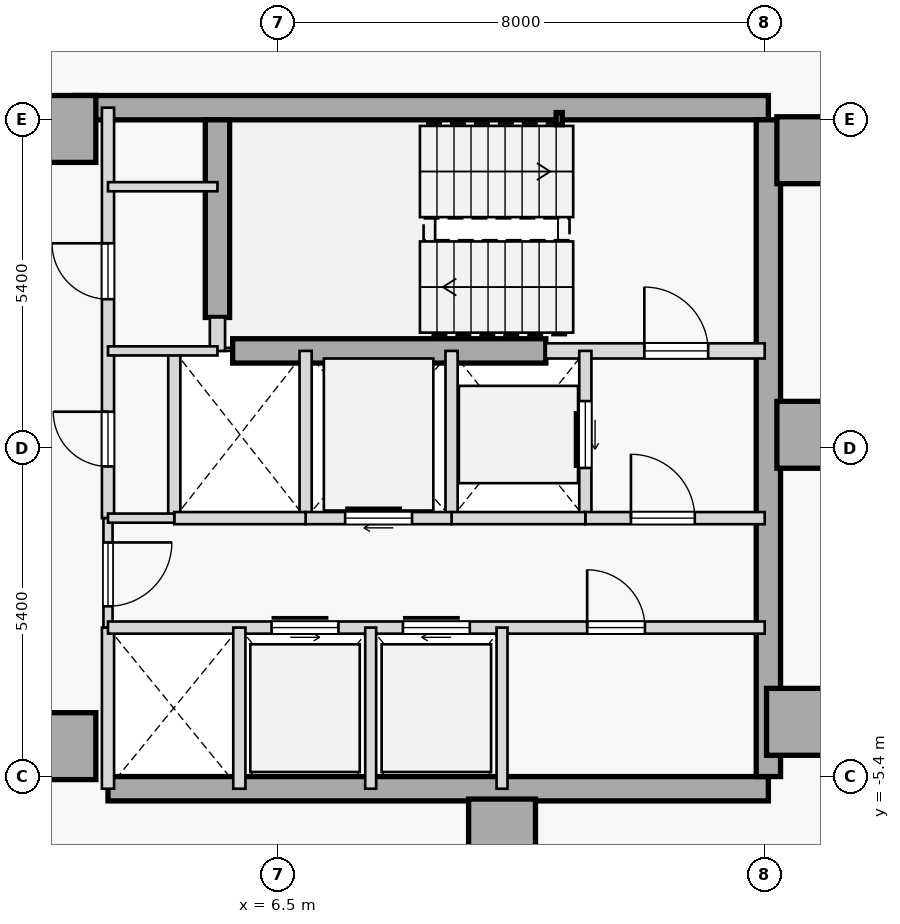
"""IFC4 building model, lengths in metres.
Left out: names, types, materials, properties, quantities, classifications, styles, units other than length and angle.
Written with IfcOpenShell. Run it as: python <this file> out.ifc"""

import sys

from ifc_helpers import new_model, si_unit, direction, frame, frame_2d, origin, origin_2d, place, context, subcontext, project, spatial, rectangle, hollow_rectangle, extrude, element, fill, save


model = new_model("IFC4")
c1 = context("Model", 3, precision=1e-05, world=origin(), true_north=direction((0.0, 1.0)))
c2 = subcontext(c1, "Body", "Model", "MODEL_VIEW")
j1 = project(units=[si_unit("LENGTHUNIT", "METRE"), si_unit("PLANEANGLEUNIT", "RADIAN")], contexts=[c1])
p1 = place(None, origin())
s1 = spatial("IfcSite", under=j1, at=p1, CompositionType="ELEMENT")
p2 = place(p1, origin())
s2 = spatial("IfcBuilding", under=s1, at=p2, CompositionType="ELEMENT")
p3 = place(p2, frame((0.0, 0.0, 151.4)))
s3 = spatial("IfcBuildingStorey", under=s2, at=p3, CompositionType="ELEMENT", Elevation=151.4)
for number, where, z_axis, x_axis in (
    (1, (15.25, 4.9, 0.0), (0.0, 0.0, 1.0), (1.0, 0.0, 0.0)),
    (2, (15.25, 0.22, 0.0), (0.0, 0.0, 1.0), (1.0, 0.0, 0.0)),
    (3, (15.08, -4.5, 0.0), (0.0, 0.0, 1.0), (1.0, 0.0, 0.0)),
    (4, (10.18, -6.32, 0.0), (0.0, 0.0, 1.0), (1.0, 0.0, 0.0)),
    (5, (2.95, -4.9, 0.0), (0.0, 0.0, 1.0), (1.0, 0.0, 0.0)),
    (6, (2.95, 5.25, 0.0), (0.0, 0.0, 1.0), (1.0, 0.0, 0.0)),
):
    element("IfcColumn", number, at=place(p3, frame(where, z_axis=z_axis, x_axis=x_axis)), inside=s3, PredefinedType="COLUMN", context=c2, shape_type="SweptSolid", body=[
        extrude(rectangle(XDim=1.1, YDim=1.1, at=origin_2d()), origin(), (0.0, 0.0, 1.0), 3.4),
    ])
p4 = place(p3, frame((3.15, 5.6, 0.0), z_axis=(0.0, 0.0, 1.0), x_axis=(1.0, 0.0, 0.0)))
e7 = element("IfcWall", 7, at=p4, inside=s3, PredefinedType="SHEAR", context=c2, shape_type="SweptSolid", body=[
    extrude(rectangle(XDim=11.41, YDim=0.4, at=frame_2d((5.705, 0.0))), origin(), (0.0, 0.0, 1.0), 3.175),
])
p5 = place(p3, frame((3.7, -5.6, 0.0), z_axis=(0.0, 0.0, 1.0), x_axis=(1.0, 0.0, 0.0)))
e8 = element("IfcWall", 8, at=p5, inside=s3, PredefinedType="SHEAR", context=c2, shape_type="SweptSolid", body=[
    extrude(rectangle(XDim=10.86, YDim=0.4, at=frame_2d((5.43, 0.0))), origin(), (0.0, 0.0, 1.0), 3.175),
])
p6 = place(p3, frame((14.56, -5.4, 0.0), z_axis=(0.0, 0.0, 1.0), x_axis=(0.0, 1.0, 0.0)))
e9 = element("IfcWall", 9, at=p6, inside=s3, PredefinedType="SHEAR", context=c2, shape_type="SweptSolid", body=[
    extrude(rectangle(XDim=10.8, YDim=0.4, at=frame_2d((5.4, 0.0))), origin(), (0.0, 0.0, 1.0), 3.175),
])
p7 = place(p3, frame((5.5, 2.15, 0.0), z_axis=(0.0, 0.0, 1.0), x_axis=(0.0, 1.0, 0.0)))
e10 = element("IfcWall", 10, at=p7, inside=s3, PredefinedType="SHEAR", context=c2, shape_type="SweptSolid", body=[
    extrude(rectangle(XDim=3.25, YDim=0.4, at=frame_2d((1.625, 0.0))), origin(), (0.0, 0.0, 1.0), 3.175),
])
p8 = place(p3, frame((5.75, 1.6, 0.0), z_axis=(0.0, 0.0, 1.0), x_axis=(1.0, 0.0, 0.0)))
e11 = element("IfcWall", 11, at=p8, inside=s3, PredefinedType="SHEAR", context=c2, shape_type="SweptSolid", body=[
    extrude(rectangle(XDim=5.15, YDim=0.4, at=frame_2d((2.575, 0.0))), origin(), (0.0, 0.0, 1.0), 3.175),
])
p9 = place(p3, frame((11.12, 5.42, 0.0), z_axis=(0.0, 0.0, 1.0), x_axis=(1.0, 0.0, 0.0)))
e12 = element("IfcColumn", 12, at=p9, inside=s3, PredefinedType="COLUMN", context=c2, shape_type="SweptSolid", body=[
    extrude(hollow_rectangle(XDim=0.1, YDim=0.2, WallThickness=0.008, at=origin_2d()), origin(), (0.0, 0.0, 1.0), 3.4),
])
p10 = place(p3, frame((10.9, 1.6, 0.0), z_axis=(0.0, 0.0, 1.0), x_axis=(1.0, 0.0, 0.0)))
e13 = element("IfcWall", 13, at=p10, inside=s3, PredefinedType="STANDARD", context=c2, shape_type="SweptSolid", body=[
    extrude(rectangle(XDim=3.6, YDim=0.25, at=frame_2d((1.8, 0.0))), origin(), (0.0, 0.0, 1.0), 3.175),
])
p11 = place(p10, frame((1.62, 0.0, 0.0)))
e14 = element("IfcOpeningElement", 14, at=p11, cuts=e13, PredefinedType="OPENING", context=c2, shape_type="SweptSolid", body=[
    extrude(rectangle(XDim=1.05, YDim=2.15, at=frame_2d((0.525, 1.075))), frame((0.0, 0.135, 0.0), z_axis=(0.0, -1.0, 0.0), x_axis=(1.0, 0.0, 0.0)), (0.0, 0.0, 1.0), 0.27),
])
p12 = place(p3, frame((5.5, 1.6, 0.0), z_axis=(0.0, 0.0, 1.0), x_axis=(0.0, 1.0, 0.0)))
e15 = element("IfcWall", 15, at=p12, inside=s3, PredefinedType="STANDARD", context=c2, shape_type="SweptSolid", body=[
    extrude(rectangle(XDim=0.55, YDim=0.25, at=frame_2d((0.275, 0.0))), origin(), (0.0, 0.0, 1.0), 3.175),
])
p13 = place(p3, frame((3.7, -1.15, 0.0), z_axis=(0.0, 0.0, 1.0), x_axis=(0.0, 1.0, 0.0)))
e16 = element("IfcWall", 16, at=p13, inside=s3, PredefinedType="STANDARD", context=c2, shape_type="SweptSolid", body=[
    extrude(rectangle(XDim=6.75, YDim=0.2, at=frame_2d((3.375, 0.0))), origin(), (0.0, 0.0, 1.0), 3.175),
])
p14 = place(p13, frame((3.6, 0.0, 0.0)))
e17 = element("IfcOpeningElement", 17, at=p14, cuts=e16, PredefinedType="OPENING", context=c2, shape_type="SweptSolid", body=[
    extrude(rectangle(XDim=0.92, YDim=2.15, at=frame_2d((0.46, 1.075))), frame((0.0, 0.11, 0.0), z_axis=(0.0, -1.0, 0.0), x_axis=(1.0, 0.0, 0.0)), (0.0, 0.0, 1.0), 0.22),
])
p15 = place(p13, frame((0.85, 0.0, 0.0)))
e18 = element("IfcOpeningElement", 18, at=p15, cuts=e16, PredefinedType="OPENING", context=c2, shape_type="SweptSolid", body=[
    extrude(rectangle(XDim=0.9, YDim=2.15, at=frame_2d((0.45, 1.075))), frame((0.0, 0.11, 0.0), z_axis=(0.0, -1.0, 0.0), x_axis=(1.0, 0.0, 0.0)), (0.0, 0.0, 1.0), 0.22),
])
p16 = place(p3, frame((3.7, -2.95, 0.0), z_axis=(0.0, 0.0, 1.0), x_axis=(0.0, 1.0, 0.0)))
e19 = element("IfcWall", 19, at=p16, inside=s3, PredefinedType="PARTITIONING", context=c2, shape_type="SweptSolid", body=[
    extrude(rectangle(XDim=1.8, YDim=0.15, at=frame_2d((0.9, 0.0))), origin(), (0.0, 0.0, 1.0), 3.175),
])
p17 = place(p16, frame((0.35, 0.0, 0.0)))
e20 = element("IfcOpeningElement", 20, at=p17, cuts=e19, PredefinedType="OPENING", context=c2, shape_type="SweptSolid", body=[
    extrude(rectangle(XDim=1.05, YDim=2.18, at=frame_2d((0.525, 1.09))), frame((0.0, 0.085, 0.0), z_axis=(0.0, -1.0, 0.0), x_axis=(1.0, 0.0, 0.0)), (0.0, 0.0, 1.0), 0.17),
])
p18 = place(p3, frame((3.7, -5.6, 0.0), z_axis=(0.0, 0.0, 1.0), x_axis=(0.0, 1.0, 0.0)))
e21 = element("IfcWall", 21, at=p18, inside=s3, PredefinedType="STANDARD", context=c2, shape_type="SweptSolid", body=[
    extrude(rectangle(XDim=2.65, YDim=0.2, at=frame_2d((1.325, 0.0))), origin(), (0.0, 0.0, 1.0), 3.175),
])
p19 = place(p3, frame((11.55, -1.15, 0.0), z_axis=(0.0, 0.0, 1.0), x_axis=(0.0, 1.0, 0.0)))
e22 = element("IfcWall", 22, at=p19, inside=s3, PredefinedType="STANDARD", context=c2, shape_type="SweptSolid", body=[
    extrude(rectangle(XDim=2.75, YDim=0.2, at=frame_2d((1.375, 0.0))), origin(), (0.0, 0.0, 1.0), 3.175),
])
p20 = place(p19, frame((0.825, 0.0, 0.0)))
e23 = element("IfcOpeningElement", 23, at=p20, cuts=e22, PredefinedType="OPENING", context=c2, shape_type="SweptSolid", body=[
    extrude(rectangle(XDim=1.1, YDim=2.15, at=frame_2d((0.55, 1.075))), frame((0.0, 0.11, 0.0), z_axis=(0.0, -1.0, 0.0), x_axis=(1.0, 0.0, 0.0)), (0.0, 0.0, 1.0), 0.22),
])
p21 = place(p3, frame((9.35, -1.15, 0.0), z_axis=(0.0, 0.0, 1.0), x_axis=(0.0, 1.0, 0.0)))
e24 = element("IfcWall", 24, at=p21, inside=s3, PredefinedType="STANDARD", context=c2, shape_type="SweptSolid", body=[
    extrude(rectangle(XDim=2.75, YDim=0.2, at=frame_2d((1.375, 0.0))), origin(), (0.0, 0.0, 1.0), 3.175),
])
p22 = place(p3, frame((11.55, -1.15, 0.0), z_axis=(0.0, 0.0, 1.0), x_axis=(1.0, 0.0, 0.0)))
e25 = element("IfcWall", 25, at=p22, inside=s3, PredefinedType="STANDARD", context=c2, shape_type="SweptSolid", body=[
    extrude(rectangle(XDim=2.95, YDim=0.2, at=frame_2d((1.475, 0.0))), origin(), (0.0, 0.0, 1.0), 3.175),
])
p23 = place(p22, frame((0.75, 0.0, 0.0)))
e26 = element("IfcOpeningElement", 26, at=p23, cuts=e25, PredefinedType="OPENING", context=c2, shape_type="SweptSolid", body=[
    extrude(rectangle(XDim=1.05, YDim=2.18, at=frame_2d((0.525, 1.09))), frame((0.0, 0.11, 0.0), z_axis=(0.0, -1.0, 0.0), x_axis=(1.0, 0.0, 0.0)), (0.0, 0.0, 1.0), 0.22),
])
p24 = place(p3, frame((9.35, -1.15, 0.0), z_axis=(0.0, 0.0, 1.0), x_axis=(1.0, 0.0, 0.0)))
e27 = element("IfcWall", 27, at=p24, inside=s3, PredefinedType="STANDARD", context=c2, shape_type="SweptSolid", body=[
    extrude(rectangle(XDim=2.2, YDim=0.2, at=frame_2d((1.1, 0.0))), origin(), (0.0, 0.0, 1.0), 3.175),
])
p25 = place(p3, frame((6.95, -1.15, 0.0), z_axis=(0.0, 0.0, 1.0), x_axis=(0.0, 1.0, 0.0)))
e28 = element("IfcWall", 28, at=p25, inside=s3, PredefinedType="STANDARD", context=c2, shape_type="SweptSolid", body=[
    extrude(rectangle(XDim=2.75, YDim=0.2, at=frame_2d((1.375, 0.0))), origin(), (0.0, 0.0, 1.0), 3.175),
])
p26 = place(p3, frame((6.95, -1.15, 0.0), z_axis=(0.0, 0.0, 1.0), x_axis=(1.0, 0.0, 0.0)))
e29 = element("IfcWall", 29, at=p26, inside=s3, PredefinedType="STANDARD", context=c2, shape_type="SweptSolid", body=[
    extrude(rectangle(XDim=2.4, YDim=0.2, at=frame_2d((1.2, 0.0))), origin(), (0.0, 0.0, 1.0), 3.175),
])
p27 = place(p26, frame((0.65, 0.0, 0.0)))
e30 = element("IfcOpeningElement", 30, at=p27, cuts=e29, PredefinedType="OPENING", context=c2, shape_type="SweptSolid", body=[
    extrude(rectangle(XDim=1.1, YDim=2.15, at=frame_2d((0.55, 1.075))), frame((0.0, 0.11, 0.0), z_axis=(0.0, -1.0, 0.0), x_axis=(1.0, 0.0, 0.0)), (0.0, 0.0, 1.0), 0.22),
])
p28 = place(p3, frame((4.79, -1.15, 0.0), z_axis=(0.0, 0.0, 1.0), x_axis=(0.0, 1.0, 0.0)))
e31 = element("IfcWall", 31, at=p28, inside=s3, PredefinedType="STANDARD", context=c2, shape_type="SweptSolid", body=[
    extrude(rectangle(XDim=2.75, YDim=0.2, at=frame_2d((1.375, 0.0))), origin(), (0.0, 0.0, 1.0), 3.175),
])
p29 = place(p3, frame((4.79, -1.15, 0.0), z_axis=(0.0, 0.0, 1.0), x_axis=(1.0, 0.0, 0.0)))
e32 = element("IfcWall", 32, at=p29, inside=s3, PredefinedType="STANDARD", context=c2, shape_type="SweptSolid", body=[
    extrude(rectangle(XDim=2.16, YDim=0.2, at=frame_2d((1.08, 0.0))), origin(), (0.0, 0.0, 1.0), 3.175),
])
p30 = place(p3, frame((3.7, -1.15, 0.0), z_axis=(0.0, 0.0, 1.0), x_axis=(1.0, 0.0, 0.0)))
e33 = element("IfcWall", 33, at=p30, inside=s3, PredefinedType="PARTITIONING", context=c2, shape_type="SweptSolid", body=[
    extrude(rectangle(XDim=1.09, YDim=0.15, at=frame_2d((0.545, 0.0))), origin(), (0.0, 0.0, 1.0), 3.175),
])
p31 = place(p3, frame((3.7, -2.95, 0.0), z_axis=(0.0, 0.0, 1.0), x_axis=(1.0, 0.0, 0.0)))
e34 = element("IfcWall", 34, at=p31, inside=s3, PredefinedType="STANDARD", context=c2, shape_type="SweptSolid", body=[
    extrude(rectangle(XDim=10.8, YDim=0.2, at=frame_2d((5.4, 0.0))), origin(), (0.0, 0.0, 1.0), 3.175),
])
p32 = place(p31, frame((2.69, 0.0, 0.0)))
e35 = element("IfcOpeningElement", 35, at=p32, cuts=e34, PredefinedType="OPENING", context=c2, shape_type="SweptSolid", body=[
    extrude(rectangle(XDim=1.1, YDim=2.15, at=frame_2d((0.55, 1.075))), frame((0.0, 0.11, 0.0), z_axis=(0.0, -1.0, 0.0), x_axis=(1.0, 0.0, 0.0)), (0.0, 0.0, 1.0), 0.22),
])
p33 = place(p31, frame((4.85, 0.0, 0.0)))
e36 = element("IfcOpeningElement", 36, at=p33, cuts=e34, PredefinedType="OPENING", context=c2, shape_type="SweptSolid", body=[
    extrude(rectangle(XDim=1.1, YDim=2.15, at=frame_2d((0.55, 1.075))), frame((0.0, 0.11, 0.0), z_axis=(0.0, -1.0, 0.0), x_axis=(1.0, 0.0, 0.0)), (0.0, 0.0, 1.0), 0.22),
])
p34 = place(p31, frame((7.88, 0.0, 0.0)))
e37 = element("IfcOpeningElement", 37, at=p34, cuts=e34, PredefinedType="OPENING", context=c2, shape_type="SweptSolid", body=[
    extrude(rectangle(XDim=0.95, YDim=2.15, at=frame_2d((0.475, 1.075))), frame((0.0, 0.11, 0.0), z_axis=(0.0, -1.0, 0.0), x_axis=(1.0, 0.0, 0.0)), (0.0, 0.0, 1.0), 0.22),
])
p35 = place(p3, frame((5.86, -5.6, 0.0), z_axis=(0.0, 0.0, 1.0), x_axis=(0.0, 1.0, 0.0)))
e38 = element("IfcWall", 38, at=p35, inside=s3, PredefinedType="STANDARD", context=c2, shape_type="SweptSolid", body=[
    extrude(rectangle(XDim=2.65, YDim=0.2, at=frame_2d((1.325, 0.0))), origin(), (0.0, 0.0, 1.0), 3.175),
])
for number, where, z_axis, x_axis in (
    (39, (10.18, -5.6, 0.0), (0.0, 0.0, 1.0), (0.0, 1.0, 0.0)),
    (40, (8.02, -5.6, 0.0), (0.0, 0.0, 1.0), (0.0, 1.0, 0.0)),
):
    element("IfcWall", number, at=place(p3, frame(where, z_axis=z_axis, x_axis=x_axis)), inside=s3, PredefinedType="STANDARD", context=c2, shape_type="SweptSolid", body=[
        extrude(rectangle(XDim=2.65, YDim=0.18, at=frame_2d((1.325, 0.0))), origin(), (0.0, 0.0, 1.0), 3.175),
    ])
for number, where, z_axis, x_axis in (
    (41, (3.7, 4.3, 0.0), (0.0, 0.0, 1.0), (1.0, 0.0, 0.0)),
    (42, (3.7, 1.6, 0.0), (0.0, 0.0, 1.0), (1.0, 0.0, 0.0)),
):
    element("IfcWall", number, at=place(p3, frame(where, z_axis=z_axis, x_axis=x_axis)), inside=s3, PredefinedType="PARTITIONING", context=c2, shape_type="SweptSolid", body=[
        extrude(rectangle(XDim=1.8, YDim=0.15, at=frame_2d((0.9, 0.0))), origin(), (0.0, 0.0, 1.0), 3.175),
    ])
p36 = place(p11, origin())
e43 = element("IfcDoor", 43, at=p36, inside=s3, OperationType="SINGLE_SWING_LEFT", PredefinedType="DOOR", context=c2, shape_type="SweptSolid", body=[
    extrude(rectangle(XDim=1.05, YDim=2.15, at=frame_2d((0.525, 1.075))), frame((0.0, 0.025, 0.0), z_axis=(0.0, -1.0, 0.0), x_axis=(1.0, 0.0, 0.0)), (0.0, 0.0, 1.0), 0.05),
])
fill(e14, e43)
p37 = place(p23, origin())
e44 = element("IfcDoor", 44, at=p37, inside=s3, OperationType="SINGLE_SWING_LEFT", PredefinedType="DOOR", context=c2, shape_type="SweptSolid", body=[
    extrude(rectangle(XDim=1.05, YDim=2.18, at=frame_2d((0.525, 1.09))), frame((0.0, 0.025, 0.0), z_axis=(0.0, -1.0, 0.0), x_axis=(1.0, 0.0, 0.0)), (0.0, 0.0, 1.0), 0.05),
])
fill(e26, e44)
p38 = place(p17, frame((1.05, 0.0, 0.0), z_axis=(0.0, 0.0, 1.0), x_axis=(-1.0, 0.0, 0.0)))
e45 = element("IfcDoor", 45, at=p38, inside=s3, OperationType="SINGLE_SWING_RIGHT", PredefinedType="DOOR", context=c2, shape_type="SweptSolid", body=[
    extrude(rectangle(XDim=1.05, YDim=2.18, at=frame_2d((0.525, 1.09))), frame((0.0, 0.025, 0.0), z_axis=(0.0, -1.0, 0.0), x_axis=(1.0, 0.0, 0.0)), (0.0, 0.0, 1.0), 0.05),
])
fill(e20, e45)
p39 = place(p20, origin())
e46 = element("IfcDoor", 46, at=p39, inside=s3, OperationType="SLIDING_TO_RIGHT", PredefinedType="DOOR", context=c2, shape_type="SweptSolid", body=[
    extrude(rectangle(XDim=1.1, YDim=2.15, at=frame_2d((0.55, 1.075))), frame((0.0, 0.025, 0.0), z_axis=(0.0, -1.0, 0.0), x_axis=(1.0, 0.0, 0.0)), (0.0, 0.0, 1.0), 0.05),
])
fill(e23, e46)
p40 = place(p27, origin())
e47 = element("IfcDoor", 47, at=p40, inside=s3, OperationType="SLIDING_TO_RIGHT", PredefinedType="DOOR", context=c2, shape_type="SweptSolid", body=[
    extrude(rectangle(XDim=1.1, YDim=2.15, at=frame_2d((0.55, 1.075))), frame((0.0, 0.025, 0.0), z_axis=(0.0, -1.0, 0.0), x_axis=(1.0, 0.0, 0.0)), (0.0, 0.0, 1.0), 0.05),
])
fill(e30, e47)
p41 = place(p32, origin())
e48 = element("IfcDoor", 48, at=p41, inside=s3, OperationType="SLIDING_TO_LEFT", PredefinedType="DOOR", context=c2, shape_type="SweptSolid", body=[
    extrude(rectangle(XDim=1.1, YDim=2.15, at=frame_2d((0.55, 1.075))), frame((0.0, 0.025, 0.0), z_axis=(0.0, -1.0, 0.0), x_axis=(1.0, 0.0, 0.0)), (0.0, 0.0, 1.0), 0.05),
])
fill(e35, e48)
p42 = place(p33, origin())
e49 = element("IfcDoor", 49, at=p42, inside=s3, OperationType="SLIDING_TO_RIGHT", PredefinedType="DOOR", context=c2, shape_type="SweptSolid", body=[
    extrude(rectangle(XDim=1.1, YDim=2.15, at=frame_2d((0.55, 1.075))), frame((0.0, 0.025, 0.0), z_axis=(0.0, -1.0, 0.0), x_axis=(1.0, 0.0, 0.0)), (0.0, 0.0, 1.0), 0.05),
])
fill(e36, e49)
p43 = place(p34, origin())
e50 = element("IfcDoor", 50, at=p43, inside=s3, OperationType="SINGLE_SWING_LEFT", PredefinedType="DOOR", context=c2, shape_type="SweptSolid", body=[
    extrude(rectangle(XDim=0.95, YDim=2.15, at=frame_2d((0.475, 1.075))), frame((0.0, 0.025, 0.0), z_axis=(0.0, -1.0, 0.0), x_axis=(1.0, 0.0, 0.0)), (0.0, 0.0, 1.0), 0.05),
])
fill(e37, e50)
p44 = place(p14, origin())
e51 = element("IfcDoor", 51, at=p44, inside=s3, OperationType="SINGLE_SWING_RIGHT", PredefinedType="DOOR", context=c2, shape_type="SweptSolid", body=[
    extrude(rectangle(XDim=0.92, YDim=2.15, at=frame_2d((0.46, 1.075))), frame((0.0, 0.025, 0.0), z_axis=(0.0, -1.0, 0.0), x_axis=(1.0, 0.0, 0.0)), (0.0, 0.0, 1.0), 0.05),
])
fill(e17, e51)
p45 = place(p15, origin())
e52 = element("IfcDoor", 52, at=p45, inside=s3, OperationType="SINGLE_SWING_RIGHT", PredefinedType="DOOR", context=c2, shape_type="SweptSolid", body=[
    extrude(rectangle(XDim=0.9, YDim=2.15, at=frame_2d((0.45, 1.075))), frame((0.0, 0.025, 0.0), z_axis=(0.0, -1.0, 0.0), x_axis=(1.0, 0.0, 0.0)), (0.0, 0.0, 1.0), 0.05),
])
fill(e18, e52)
save(model, sys.argv[1])
